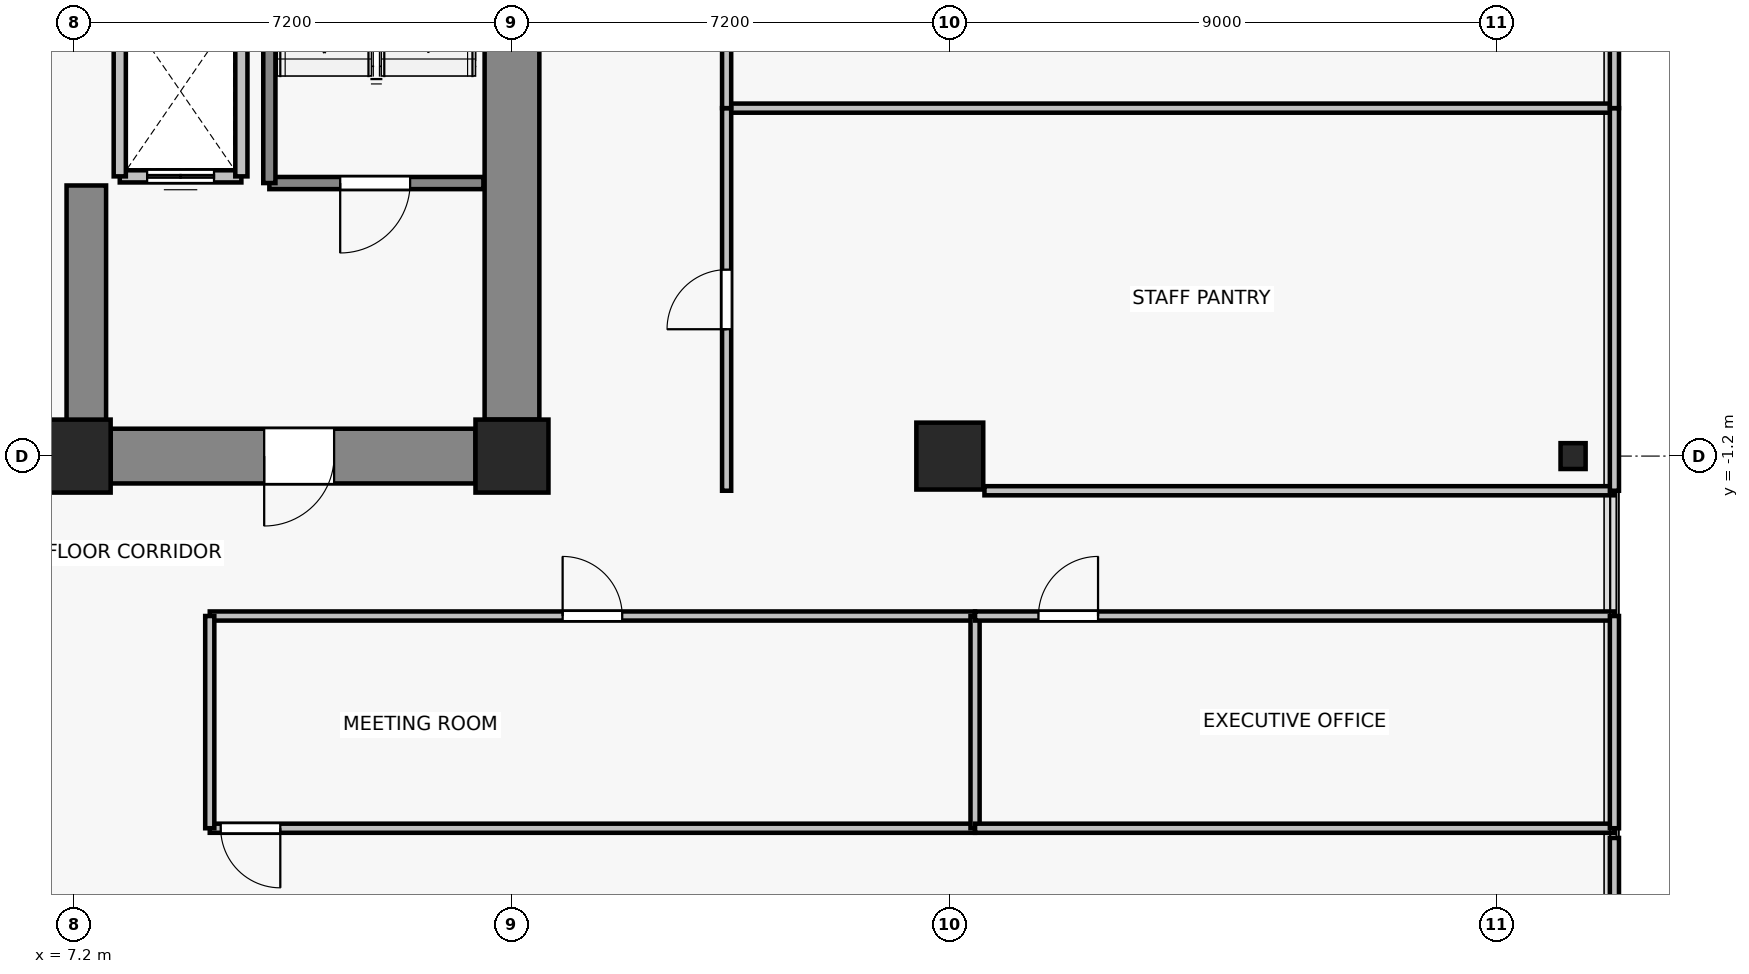
"""IFC4 building model, lengths in metres.
Left out: names, types, materials, properties, quantities, classifications, styles, units other than length and angle.
Written with IfcOpenShell. Run it as: python <this file> out.ifc"""

import sys

from ifc_helpers import new_model, si_unit, direction, frame, frame_2d, origin, origin_2d, place, context, subcontext, project, spatial, rectangle, i_section, extrude, source, transform, mapped, element, fill, save


model = new_model("IFC4")
c1 = context("Model", 3, precision=1e-05, world=origin(), true_north=direction((0.0, 1.0)))
c2 = subcontext(c1, "Body", "Model", "MODEL_VIEW")
j1 = project(units=[si_unit("LENGTHUNIT", "METRE"), si_unit("PLANEANGLEUNIT", "RADIAN")], contexts=[c1])
p1 = place(None, origin())
s1 = spatial("IfcSite", under=j1, at=p1, CompositionType="ELEMENT")
p2 = place(p1, origin())
s2 = spatial("IfcBuilding", under=s1, at=p2, CompositionType="ELEMENT")
p3 = place(p2, frame((0.0, 0.0, 67.0)))
s3 = spatial("IfcBuildingStorey", under=s2, at=p3, CompositionType="ELEMENT", Elevation=67.0)
for number, where, z_axis, x_axis in (
    (1, (7.2, -1.2, 0.0), (0.0, 0.0, 1.0), (1.0, 0.0, 0.0)),
    (2, (14.4, -1.2, 0.0), (0.0, 0.0, 1.0), (1.0, 0.0, 0.0)),
):
    element("IfcColumn", number, at=place(p3, frame(where, z_axis=z_axis, x_axis=x_axis)), inside=s3, PredefinedType="COLUMN", context=c2, shape_type="SweptSolid", body=[
        extrude(rectangle(XDim=1.2, YDim=1.2, at=origin_2d()), origin(), (0.0, 0.0, 1.0), 3.3),
    ])
p4 = place(p3, frame((21.6, -1.2, 0.0), z_axis=(0.0, 0.0, 1.0), x_axis=(1.0, 0.0, 0.0)))
e3 = element("IfcColumn", 3, at=p4, inside=s3, PredefinedType="COLUMN", context=c2, shape_type="SweptSolid", body=[
    extrude(rectangle(XDim=1.1, YDim=1.1, at=origin_2d()), origin(), (0.0, 0.0, 1.0), 3.3),
])
p5 = place(p3, frame((31.85, -1.2, 0.0), z_axis=(0.0, 0.0, 1.0), x_axis=(1.0, 0.0, 0.0)))
e4 = element("IfcColumn", 4, at=p5, inside=s3, PredefinedType="COLUMN", context=c2, shape_type="SweptSolid", body=[
    extrude(i_section(OverallWidth=0.412, OverallDepth=0.425, WebThickness=0.026, FlangeThickness=0.039, FilletRadius=0.015, at=origin_2d()), origin(), (0.0, 0.0, 1.0), 3.3),
])
p6 = place(p3, frame((14.4, -0.6, 0.0), z_axis=(0.0, 0.0, 1.0), x_axis=(0.0, 1.0, 0.0)))
e5 = element("IfcWall", 5, at=p6, inside=s3, PredefinedType="SHEAR", context=c2, shape_type="SweptSolid", body=[
    extrude(rectangle(XDim=6.6, YDim=0.9, at=frame_2d((3.3, 0.0))), origin(), (0.0, 0.0, 1.0), 3.075),
])
p7 = place(p3, frame((13.8, -1.2, 0.0), z_axis=(0.0, 0.0, 1.0), x_axis=(-1.0, 0.0, 0.0)))
e6 = element("IfcWall", 6, at=p7, inside=s3, PredefinedType="SHEAR", context=c2, shape_type="SweptSolid", body=[
    extrude(rectangle(XDim=6.0, YDim=0.9, at=frame_2d((3.0, 0.0))), origin(), (0.0, 0.0, 1.0), 3.075),
])
p8 = place(p7, frame((2.325, 0.0, 0.0)))
e7 = element("IfcOpeningElement", 7, at=p8, cuts=e6, PredefinedType="OPENING", context=c2, shape_type="SweptSolid", body=[
    extrude(rectangle(XDim=1.15, YDim=2.15, at=frame_2d((0.575, 1.075))), frame((0.0, 0.46, 0.0), z_axis=(0.0, -1.0, 0.0), x_axis=(1.0, 0.0, 0.0)), (0.0, 0.0, 1.0), 0.92),
])
p9 = place(p3, frame((7.4, -0.75, 0.0), z_axis=(0.0, 0.0, 1.0), x_axis=(0.0, 1.0, 0.0)))
e8 = element("IfcWall", 8, at=p9, inside=s3, PredefinedType="SHEAR", context=c2, shape_type="SweptSolid", body=[
    extrude(rectangle(XDim=4.0, YDim=0.65, at=frame_2d((2.0, 0.0))), origin(), (0.0, 0.0, 1.0), 3.075),
])
p10 = place(p3, frame((9.95, 3.4, 0.0), z_axis=(0.0, 0.0, 1.0), x_axis=(-1.0, 0.0, 0.0)))
e9 = element("IfcWall", 9, at=p10, inside=s3, PredefinedType="SOLIDWALL", context=c2, shape_type="SweptSolid", body=[
    extrude(rectangle(XDim=2.0, YDim=0.2, at=frame_2d((1.0, 0.0))), origin(), (0.0, 0.0, 1.0), 3.075),
])
p11 = place(p10, frame((0.45, 0.0, 0.0)))
e10 = element("IfcOpeningElement", 10, at=p11, cuts=e9, PredefinedType="OPENING", context=c2, shape_type="SweptSolid", body=[
    extrude(rectangle(XDim=1.1, YDim=2.2, at=frame_2d((0.55, 1.1))), frame((0.0, 0.11, 0.0), z_axis=(0.0, -1.0, 0.0), x_axis=(1.0, 0.0, 0.0)), (0.0, 0.0, 1.0), 0.22),
])
for number, where, z_axis, x_axis in (
    (11, (7.95, 3.4, 0.0), (0.0, 0.0, 1.0), (0.0, 1.0, 0.0)),
    (12, (9.95, 6.2, 0.0), (0.0, 0.0, 1.0), (0.0, -1.0, 0.0)),
):
    element("IfcWall", number, at=place(p3, frame(where, z_axis=z_axis, x_axis=x_axis)), inside=s3, PredefinedType="SOLIDWALL", context=c2, shape_type="SweptSolid", body=[
        extrude(rectangle(XDim=2.8, YDim=0.2, at=frame_2d((1.4, 0.0))), origin(), (0.0, 0.0, 1.0), 3.075),
    ])
p12 = place(p3, frame((13.93, 3.29, 0.0), z_axis=(0.0, 0.0, 1.0), x_axis=(-1.0, 0.0, 0.0)))
e13 = element("IfcWall", 13, at=p12, inside=s3, PredefinedType="SOLIDWALL", context=c2, shape_type="SweptSolid", body=[
    extrude(rectangle(XDim=3.52, YDim=0.2, at=frame_2d((1.76, 0.0))), origin(), (0.0, 0.0, 1.0), 3.075),
])
p13 = place(p12, frame((1.205, 0.0, 0.0)))
e14 = element("IfcOpeningElement", 14, at=p13, cuts=e13, PredefinedType="OPENING", context=c2, shape_type="SweptSolid", body=[
    extrude(rectangle(XDim=1.15, YDim=2.15, at=frame_2d((0.575, 1.075))), frame((0.0, 0.11, 0.0), z_axis=(0.0, -1.0, 0.0), x_axis=(1.0, 0.0, 0.0)), (0.0, 0.0, 1.0), 0.22),
])
p14 = place(p3, frame((10.41, 3.29, 0.0), z_axis=(0.0, 0.0, 1.0), x_axis=(0.0, 1.0, 0.0)))
e15 = element("IfcWall", 15, at=p14, inside=s3, PredefinedType="SOLIDWALL", context=c2, shape_type="SweptSolid", body=[
    extrude(rectangle(XDim=8.84, YDim=0.2, at=frame_2d((4.42, 0.0))), origin(), (0.0, 0.0, 1.0), 3.075),
])
p15 = place(p3, frame((22.015, -7.32, 0.0), z_axis=(0.0, 0.0, 1.0), x_axis=(-1.0, 0.0, 0.0)))
e16 = element("IfcWall", 16, at=p15, inside=s3, PredefinedType="PARTITIONING", context=c2, shape_type="SweptSolid", body=[
    extrude(rectangle(XDim=12.585, YDim=0.15, at=frame_2d((6.293, 0.0))), origin(), (0.0, 0.0, 1.0), 2.465),
])
p16 = place(p15, frame((11.426, 0.0, 0.0)))
e17 = element("IfcOpeningElement", 17, at=p16, cuts=e16, PredefinedType="OPENING", context=c2, shape_type="SweptSolid", body=[
    extrude(rectangle(XDim=0.98, YDim=2.15, at=frame_2d((0.49, 1.075))), frame((0.0, 0.085, 0.0), z_axis=(0.0, -1.0, 0.0), x_axis=(1.0, 0.0, 0.0)), (0.0, 0.0, 1.0), 0.17),
])
p17 = place(p3, frame((9.43, -3.83, 0.0), z_axis=(0.0, 0.0, 1.0), x_axis=(1.0, 0.0, 0.0)))
e18 = element("IfcWall", 18, at=p17, inside=s3, PredefinedType="PARTITIONING", context=c2, shape_type="SweptSolid", body=[
    extrude(rectangle(XDim=12.585, YDim=0.15, at=frame_2d((6.293, 0.0))), origin(), (0.0, 0.0, 1.0), 2.465),
])
p18 = place(p17, frame((5.803, 0.0, 0.0)))
e19 = element("IfcOpeningElement", 19, at=p18, cuts=e18, PredefinedType="OPENING", context=c2, shape_type="SweptSolid", body=[
    extrude(rectangle(XDim=0.98, YDim=2.15, at=frame_2d((0.49, 1.075))), frame((0.0, 0.085, 0.0), z_axis=(0.0, -1.0, 0.0), x_axis=(1.0, 0.0, 0.0)), (0.0, 0.0, 1.0), 0.17),
])
for number, where, z_axis, x_axis in (
    (20, (9.43, -7.32, 0.0), (0.0, 0.0, 1.0), (0.0, 1.0, 0.0)),
    (21, (22.015, -3.83, 0.0), (0.0, 0.0, 1.0), (0.0, -1.0, 0.0)),
):
    element("IfcWall", number, at=place(p3, frame(where, z_axis=z_axis, x_axis=x_axis)), inside=s3, PredefinedType="PARTITIONING", context=c2, shape_type="SweptSolid", body=[
        extrude(rectangle(XDim=3.49, YDim=0.15, at=frame_2d((1.745, 0.0))), origin(), (0.0, 0.0, 1.0), 2.565),
    ])
p19 = place(p3, frame((32.53, -7.32, 0.0), z_axis=(0.0, 0.0, 1.0), x_axis=(-1.0, 0.0, 0.0)))
e22 = element("IfcWall", 22, at=p19, inside=s3, PredefinedType="PARTITIONING", context=c2, shape_type="SweptSolid", body=[
    extrude(rectangle(XDim=10.515, YDim=0.15, at=frame_2d((5.257, 0.0))), origin(), (0.0, 0.0, 1.0), 2.465),
])
p20 = place(p3, frame((22.015, -3.83, 0.0), z_axis=(0.0, 0.0, 1.0), x_axis=(1.0, 0.0, 0.0)))
e23 = element("IfcWall", 23, at=p20, inside=s3, PredefinedType="PARTITIONING", context=c2, shape_type="SweptSolid", body=[
    extrude(rectangle(XDim=10.515, YDim=0.15, at=frame_2d((5.257, 0.0))), origin(), (0.0, 0.0, 1.0), 2.465),
])
p21 = place(p20, frame((1.042, 0.0, 0.0)))
e24 = element("IfcOpeningElement", 24, at=p21, cuts=e23, PredefinedType="OPENING", context=c2, shape_type="SweptSolid", body=[
    extrude(rectangle(XDim=0.98, YDim=2.15, at=frame_2d((0.49, 1.075))), frame((0.0, 0.085, 0.0), z_axis=(0.0, -1.0, 0.0), x_axis=(1.0, 0.0, 0.0)), (0.0, 0.0, 1.0), 0.17),
])
p22 = place(p3, frame((32.53, -3.83, 0.0), z_axis=(0.0, 0.0, 1.0), x_axis=(0.0, -1.0, 0.0)))
e25 = element("IfcWall", 25, at=p22, inside=s3, PredefinedType="PARTITIONING", context=c2, shape_type="SweptSolid", body=[
    extrude(rectangle(XDim=3.49, YDim=0.15, at=frame_2d((1.745, 0.0))), origin(), (0.0, 0.0, 1.0), 3.075),
])
p23 = place(p3, frame((32.53, -7.48, 0.0), z_axis=(0.0, 0.0, 1.0), x_axis=(0.0, -1.0, 0.0)))
e26 = element("IfcWall", 26, at=p23, inside=s3, PredefinedType="PARTITIONING", context=c2, shape_type="SweptSolid", body=[
    extrude(rectangle(XDim=10.65, YDim=0.15, at=frame_2d((5.325, 0.0))), origin(), (0.0, 0.0, 1.0), 2.665),
])
p24 = place(p3, frame((32.53, -1.77, 0.0), z_axis=(0.0, 0.0, 1.0), x_axis=(-1.0, 0.0, 0.0)))
e27 = element("IfcWall", 27, at=p24, inside=s3, PredefinedType="PARTITIONING", context=c2, shape_type="SweptSolid", body=[
    extrude(rectangle(XDim=10.36, YDim=0.15, at=frame_2d((5.18, 0.0))), origin(), (0.0, 0.0, 1.0), 2.465),
])
p25 = place(p3, frame((17.93, 4.522, 0.0), z_axis=(0.0, 0.0, 1.0), x_axis=(1.0, 0.0, 0.0)))
e28 = element("IfcWall", 28, at=p25, inside=s3, PredefinedType="PARTITIONING", context=c2, shape_type="SweptSolid", body=[
    extrude(rectangle(XDim=14.6, YDim=0.15, at=frame_2d((7.3, 0.0))), origin(), (0.0, 0.0, 1.0), 2.465),
])
p26 = place(p3, frame((17.93, -1.77, 0.0), z_axis=(0.0, 0.0, 1.0), x_axis=(0.0, 1.0, 0.0)))
e29 = element("IfcWall", 29, at=p26, inside=s3, PredefinedType="PARTITIONING", context=c2, shape_type="SweptSolid", body=[
    extrude(rectangle(XDim=6.292, YDim=0.15, at=frame_2d((3.146, 0.0))), origin(), (0.0, 0.0, 1.0), 2.465),
])
p27 = place(p26, frame((2.656, 0.0, 0.0)))
e30 = element("IfcOpeningElement", 30, at=p27, cuts=e29, PredefinedType="OPENING", context=c2, shape_type="SweptSolid", body=[
    extrude(rectangle(XDim=0.98, YDim=2.15, at=frame_2d((0.49, 1.075))), frame((0.0, 0.085, 0.0), z_axis=(0.0, -1.0, 0.0), x_axis=(1.0, 0.0, 0.0)), (0.0, 0.0, 1.0), 0.17),
])
p28 = place(p3, frame((32.53, 4.522, 0.0), z_axis=(0.0, 0.0, 1.0), x_axis=(0.0, -1.0, 0.0)))
e31 = element("IfcWall", 31, at=p28, inside=s3, PredefinedType="PARTITIONING", context=c2, shape_type="SweptSolid", body=[
    extrude(rectangle(XDim=6.292, YDim=0.15, at=frame_2d((3.146, 0.0))), origin(), (0.0, 0.0, 1.0), 3.075),
])
p29 = place(p3, frame((17.93, 4.522, 0.0), z_axis=(0.0, 0.0, 1.0), x_axis=(0.0, 1.0, 0.0)))
e32 = element("IfcWall", 32, at=p29, inside=s3, PredefinedType="PARTITIONING", context=c2, shape_type="SweptSolid", body=[
    extrude(rectangle(XDim=9.358, YDim=0.15, at=frame_2d((4.679, 0.0))), origin(), (0.0, 0.0, 1.0), 2.465),
])
p30 = place(p29, frame((4.189, 0.0, 0.0)))
e33 = element("IfcOpeningElement", 33, at=p30, cuts=e32, PredefinedType="OPENING", context=c2, shape_type="SweptSolid", body=[
    extrude(rectangle(XDim=0.98, YDim=2.15, at=frame_2d((0.49, 1.075))), frame((0.0, 0.085, 0.0), z_axis=(0.0, -1.0, 0.0), x_axis=(1.0, 0.0, 0.0)), (0.0, 0.0, 1.0), 0.17),
])
p31 = place(p3, frame((32.53, 13.88, 0.0), z_axis=(0.0, 0.0, 1.0), x_axis=(0.0, -1.0, 0.0)))
e34 = element("IfcWall", 34, at=p31, inside=s3, PredefinedType="PARTITIONING", context=c2, shape_type="SweptSolid", body=[
    extrude(rectangle(XDim=9.358, YDim=0.15, at=frame_2d((4.679, 0.0))), origin(), (0.0, 0.0, 1.0), 3.075),
])
m1 = source(origin(), c2, "Body", "SweptSolid", [
    extrude(rectangle(XDim=1.1, YDim=2.2, at=frame_2d((0.55, 1.1))), frame((0.0, 0.025, 0.0), z_axis=(0.0, -1.0, 0.0), x_axis=(1.0, 0.0, 0.0)), (0.0, 0.0, 1.0), 0.05),
])
p32 = place(p11, origin())
e35 = element("IfcDoor", 35, at=p32, inside=s3, OperationType="DOUBLE_DOOR_SLIDING", PredefinedType="DOOR", context=c2, shape_type="MappedRepresentation", body=[
    mapped(m1, transform((0.0, 0.0, 0.0), x_axis=(1.0, 0.0, 0.0), y_axis=(0.0, 1.0, 0.0), z_axis=(0.0, 0.0, 1.0), scale=1.0)),
])
fill(e10, e35)
m2 = source(origin(), c2, "Body", "SweptSolid", [
    extrude(rectangle(XDim=1.15, YDim=2.15, at=frame_2d((0.575, 1.075))), frame((0.0, 0.025, 0.0), z_axis=(0.0, -1.0, 0.0), x_axis=(1.0, 0.0, 0.0)), (0.0, 0.0, 1.0), 0.05),
])
p33 = place(p13, origin())
e36 = element("IfcDoor", 36, at=p33, inside=s3, OperationType="SINGLE_SWING_RIGHT", PredefinedType="DOOR", context=c2, shape_type="MappedRepresentation", body=[
    mapped(m2, transform((0.0, 0.0, 0.0), x_axis=(1.0, 0.0, 0.0), y_axis=(0.0, 1.0, 0.0), z_axis=(0.0, 0.0, 1.0), scale=1.0)),
])
fill(e14, e36)
p34 = place(p8, origin())
e37 = element("IfcDoor", 37, at=p34, inside=s3, OperationType="SINGLE_SWING_RIGHT", PredefinedType="DOOR", context=c2, shape_type="MappedRepresentation", body=[
    mapped(m2, transform((0.0, 0.0, 0.0), x_axis=(1.0, 0.0, 0.0), y_axis=(0.0, 1.0, 0.0), z_axis=(0.0, 0.0, 1.0), scale=1.0)),
])
fill(e7, e37)
m3 = source(origin(), c2, "Body", "SweptSolid", [
    extrude(rectangle(XDim=0.98, YDim=2.15, at=frame_2d((0.49, 1.075))), frame((0.0, 0.025, 0.0), z_axis=(0.0, -1.0, 0.0), x_axis=(1.0, 0.0, 0.0)), (0.0, 0.0, 1.0), 0.05),
])
p35 = place(p18, origin())
e38 = element("IfcDoor", 38, at=p35, inside=s3, OperationType="SINGLE_SWING_LEFT", PredefinedType="DOOR", context=c2, shape_type="MappedRepresentation", body=[
    mapped(m3, transform((0.0, 0.0, 0.0), x_axis=(1.0, 0.0, 0.0), y_axis=(0.0, 1.0, 0.0), z_axis=(0.0, 0.0, 1.0), scale=1.0)),
])
fill(e19, e38)
p36 = place(p21, origin())
e39 = element("IfcDoor", 39, at=p36, inside=s3, OperationType="SINGLE_SWING_RIGHT", PredefinedType="DOOR", context=c2, shape_type="MappedRepresentation", body=[
    mapped(m3, transform((0.0, 0.0, 0.0), x_axis=(1.0, 0.0, 0.0), y_axis=(0.0, 1.0, 0.0), z_axis=(0.0, 0.0, 1.0), scale=1.0)),
])
fill(e24, e39)
p37 = place(p16, origin())
e40 = element("IfcDoor", 40, at=p37, inside=s3, OperationType="SINGLE_SWING_LEFT", PredefinedType="DOOR", context=c2, shape_type="MappedRepresentation", body=[
    mapped(m3, transform((0.0, 0.0, 0.0), x_axis=(1.0, 0.0, 0.0), y_axis=(0.0, 1.0, 0.0), z_axis=(0.0, 0.0, 1.0), scale=1.0)),
])
fill(e17, e40)
p38 = place(p27, origin())
e41 = element("IfcDoor", 41, at=p38, inside=s3, OperationType="SINGLE_SWING_LEFT", PredefinedType="DOOR", context=c2, shape_type="MappedRepresentation", body=[
    mapped(m3, transform((0.0, 0.0, 0.0), x_axis=(1.0, 0.0, 0.0), y_axis=(0.0, 1.0, 0.0), z_axis=(0.0, 0.0, 1.0), scale=1.0)),
])
fill(e30, e41)
save(model, sys.argv[1])
